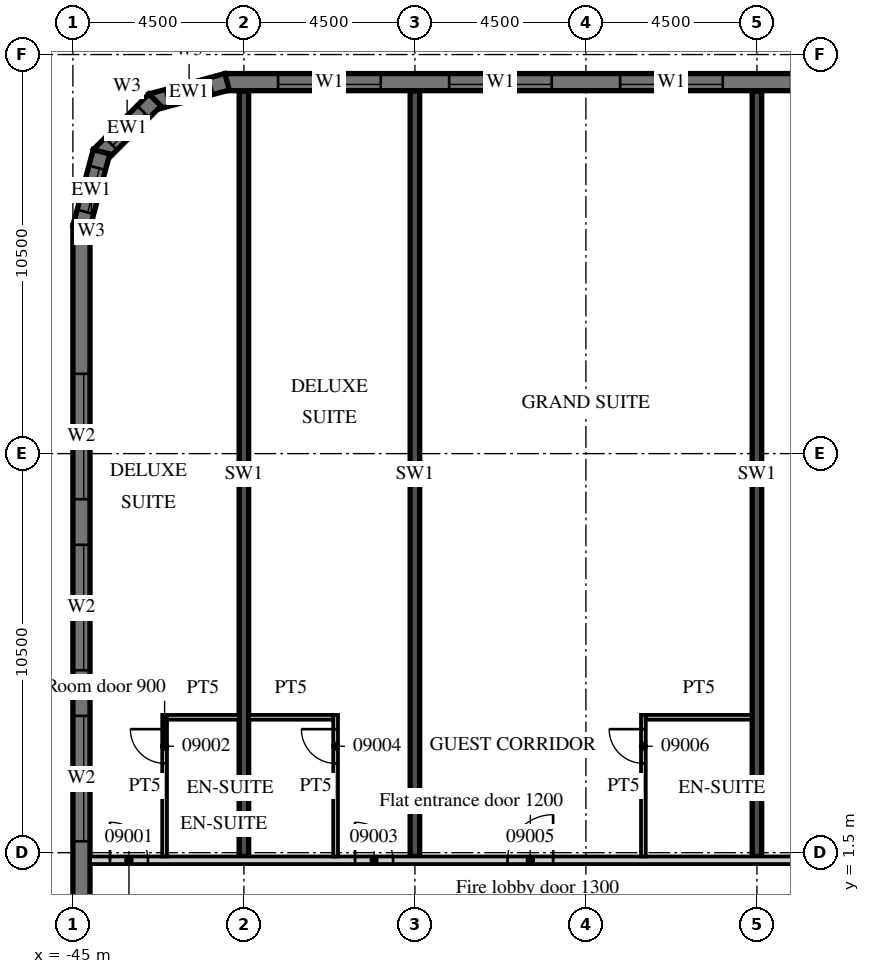
"""IFC4 building model, lengths in metres.
Left out: names, types, materials, properties, quantities, classifications, styles, units other than length and angle.
Written with IfcOpenShell. Run it as: python <this file> out.ifc"""

import sys

from ifc_helpers import new_model, si_unit, direction, frame, frame_2d, origin, place, context, subcontext, project, spatial, polyline, rectangle, outline, extrude, element, fill, save


model = new_model("IFC4")
c1 = context("Model", 3, precision=1e-05, world=origin(), true_north=direction((0.0, 1.0)))
c2 = subcontext(c1, "Body", "Model", "MODEL_VIEW")
j1 = project(units=[si_unit("LENGTHUNIT", "METRE"), si_unit("PLANEANGLEUNIT", "RADIAN")], contexts=[c1])
p1 = place(None, origin())
s1 = spatial("IfcSite", under=j1, at=p1, CompositionType="ELEMENT")
p2 = place(p1, origin())
s2 = spatial("IfcBuilding", under=s1, at=p2, CompositionType="ELEMENT")
p3 = place(p2, frame((0.0, 0.0, 60.0)))
s3 = spatial("IfcBuildingStorey", under=s2, at=p3, CompositionType="ELEMENT", Elevation=60.0)
for number, where, z_axis, x_axis in (
    (1, (-40.5, 1.4, 0.0), (0.0, 0.0, 1.0), (0.0, 1.0, 0.0)),
    (2, (-36.0, 1.4, 0.0), (0.0, 0.0, 1.0), (0.0, 1.0, 0.0)),
    (3, (-27.0, 1.4, 0.0), (0.0, 0.0, 1.0), (0.0, 1.0, 0.0)),
):
    element("IfcWall", number, at=place(p3, frame(where, z_axis=z_axis, x_axis=x_axis)), inside=s3, PredefinedType="SHEAR", context=c2, shape_type="SweptSolid", body=[
        extrude(rectangle(XDim=20.14, YDim=0.25, at=frame_2d((10.07, 0.0))), origin(), (0.0, 0.0, 1.0), 3.3),
    ])
p4 = place(p3, frame((13.5, 21.775, 0.0), z_axis=(0.0, 0.0, 1.0), x_axis=(-1.0, 0.0, 0.0)))
e4 = element("IfcWall", 4, at=p4, inside=s3, PredefinedType="SOLIDWALL", context=c2, shape_type="SweptSolid", body=[
    extrude(rectangle(XDim=54.5, YDim=0.45, at=frame_2d((27.25, 0.0))), origin(), (0.0, 0.0, 1.0), 3.02),
])
p5 = place(p4, frame((0.9, 0.0, 0.45)))
e5 = element("IfcOpeningElement", 5, at=p5, cuts=e4, PredefinedType="OPENING", context=c2, shape_type="SweptSolid", body=[
    extrude(rectangle(XDim=2.7, YDim=2.25, at=frame_2d((1.35, 1.125))), frame((0.0, 0.235, 0.0), z_axis=(0.0, -1.0, 0.0), x_axis=(1.0, 0.0, 0.0)), (0.0, 0.0, 1.0), 0.47),
])
p6 = place(p4, frame((5.4, 0.0, 0.45)))
e6 = element("IfcOpeningElement", 6, at=p6, cuts=e4, PredefinedType="OPENING", context=c2, shape_type="SweptSolid", body=[
    extrude(rectangle(XDim=2.7, YDim=2.25, at=frame_2d((1.35, 1.125))), frame((0.0, 0.235, 0.0), z_axis=(0.0, -1.0, 0.0), x_axis=(1.0, 0.0, 0.0)), (0.0, 0.0, 1.0), 0.47),
])
p7 = place(p4, frame((9.9, 0.0, 0.45)))
e7 = element("IfcOpeningElement", 7, at=p7, cuts=e4, PredefinedType="OPENING", context=c2, shape_type="SweptSolid", body=[
    extrude(rectangle(XDim=2.7, YDim=2.25, at=frame_2d((1.35, 1.125))), frame((0.0, 0.235, 0.0), z_axis=(0.0, -1.0, 0.0), x_axis=(1.0, 0.0, 0.0)), (0.0, 0.0, 1.0), 0.47),
])
p8 = place(p4, frame((14.4, 0.0, 0.45)))
e8 = element("IfcOpeningElement", 8, at=p8, cuts=e4, PredefinedType="OPENING", context=c2, shape_type="SweptSolid", body=[
    extrude(rectangle(XDim=2.7, YDim=2.25, at=frame_2d((1.35, 1.125))), frame((0.0, 0.235, 0.0), z_axis=(0.0, -1.0, 0.0), x_axis=(1.0, 0.0, 0.0)), (0.0, 0.0, 1.0), 0.47),
])
p9 = place(p4, frame((18.9, 0.0, 0.45)))
e9 = element("IfcOpeningElement", 9, at=p9, cuts=e4, PredefinedType="OPENING", context=c2, shape_type="SweptSolid", body=[
    extrude(rectangle(XDim=2.7, YDim=2.25, at=frame_2d((1.35, 1.125))), frame((0.0, 0.235, 0.0), z_axis=(0.0, -1.0, 0.0), x_axis=(1.0, 0.0, 0.0)), (0.0, 0.0, 1.0), 0.47),
])
p10 = place(p4, frame((23.4, 0.0, 0.45)))
e10 = element("IfcOpeningElement", 10, at=p10, cuts=e4, PredefinedType="OPENING", context=c2, shape_type="SweptSolid", body=[
    extrude(rectangle(XDim=2.7, YDim=2.25, at=frame_2d((1.35, 1.125))), frame((0.0, 0.235, 0.0), z_axis=(0.0, -1.0, 0.0), x_axis=(1.0, 0.0, 0.0)), (0.0, 0.0, 1.0), 0.47),
])
p11 = place(p4, frame((27.9, 0.0, 0.45)))
e11 = element("IfcOpeningElement", 11, at=p11, cuts=e4, PredefinedType="OPENING", context=c2, shape_type="SweptSolid", body=[
    extrude(rectangle(XDim=2.7, YDim=2.25, at=frame_2d((1.35, 1.125))), frame((0.0, 0.235, 0.0), z_axis=(0.0, -1.0, 0.0), x_axis=(1.0, 0.0, 0.0)), (0.0, 0.0, 1.0), 0.47),
])
p12 = place(p4, frame((32.4, 0.0, 0.45)))
e12 = element("IfcOpeningElement", 12, at=p12, cuts=e4, PredefinedType="OPENING", context=c2, shape_type="SweptSolid", body=[
    extrude(rectangle(XDim=2.7, YDim=2.25, at=frame_2d((1.35, 1.125))), frame((0.0, 0.235, 0.0), z_axis=(0.0, -1.0, 0.0), x_axis=(1.0, 0.0, 0.0)), (0.0, 0.0, 1.0), 0.47),
])
p13 = place(p4, frame((36.9, 0.0, 0.45)))
e13 = element("IfcOpeningElement", 13, at=p13, cuts=e4, PredefinedType="OPENING", context=c2, shape_type="SweptSolid", body=[
    extrude(rectangle(XDim=2.7, YDim=2.25, at=frame_2d((1.35, 1.125))), frame((0.0, 0.235, 0.0), z_axis=(0.0, -1.0, 0.0), x_axis=(1.0, 0.0, 0.0)), (0.0, 0.0, 1.0), 0.47),
])
p14 = place(p4, frame((41.4, 0.0, 0.45)))
e14 = element("IfcOpeningElement", 14, at=p14, cuts=e4, PredefinedType="OPENING", context=c2, shape_type="SweptSolid", body=[
    extrude(rectangle(XDim=2.7, YDim=2.25, at=frame_2d((1.35, 1.125))), frame((0.0, 0.235, 0.0), z_axis=(0.0, -1.0, 0.0), x_axis=(1.0, 0.0, 0.0)), (0.0, 0.0, 1.0), 0.47),
])
p15 = place(p4, frame((45.9, 0.0, 0.45)))
e15 = element("IfcOpeningElement", 15, at=p15, cuts=e4, PredefinedType="OPENING", context=c2, shape_type="SweptSolid", body=[
    extrude(rectangle(XDim=2.7, YDim=2.25, at=frame_2d((1.35, 1.125))), frame((0.0, 0.235, 0.0), z_axis=(0.0, -1.0, 0.0), x_axis=(1.0, 0.0, 0.0)), (0.0, 0.0, 1.0), 0.47),
])
p16 = place(p4, frame((50.4, 0.0, 0.45)))
e16 = element("IfcOpeningElement", 16, at=p16, cuts=e4, PredefinedType="OPENING", context=c2, shape_type="SweptSolid", body=[
    extrude(rectangle(XDim=2.7, YDim=2.25, at=frame_2d((1.35, 1.125))), frame((0.0, 0.235, 0.0), z_axis=(0.0, -1.0, 0.0), x_axis=(1.0, 0.0, 0.0)), (0.0, 0.0, 1.0), 0.47),
])
p17 = place(p3, frame((-40.942, 21.783, 0.0), z_axis=(0.0, 0.0, 1.0), x_axis=(-0.965926999034, -0.25881466832, 0.0)))
e17 = element("IfcWall", 17, at=p17, inside=s3, PredefinedType="SOLIDWALL", context=c2, shape_type="SweptSolid", body=[
    extrude(outline(polyline([(0.0, -0.225), (2.071, -0.225), (1.95, 0.225), (0.121, 0.225), (0.0, -0.225)])), origin(), (0.0, 0.0, 1.0), 3.02),
])
p18 = place(p17, frame((0.435, 0.0, 0.45)))
e18 = element("IfcOpeningElement", 18, at=p18, cuts=e17, PredefinedType="OPENING", context=c2, shape_type="SweptSolid", body=[
    extrude(rectangle(XDim=1.2, YDim=2.25, at=frame_2d((0.6, 1.125))), frame((0.0, 0.235, 0.0), z_axis=(0.0, -1.0, 0.0), x_axis=(1.0, 0.0, 0.0)), (0.0, 0.0, 1.0), 0.47),
])
p19 = place(p3, frame((-42.841, 21.305, 0.0), z_axis=(0.0, 0.0, 1.0), x_axis=(-0.707106781187, -0.707106781187, 0.0)))
e19 = element("IfcWall", 19, at=p19, inside=s3, PredefinedType="SOLIDWALL", context=c2, shape_type="SweptSolid", body=[
    extrude(outline(polyline([(0.0, -0.225), (2.071, -0.225), (1.95, 0.225), (0.121, 0.225), (0.0, -0.225)])), origin(), (0.0, 0.0, 1.0), 3.02),
])
p20 = place(p19, frame((0.435, 0.0, 0.45)))
e20 = element("IfcOpeningElement", 20, at=p20, cuts=e19, PredefinedType="OPENING", context=c2, shape_type="SweptSolid", body=[
    extrude(rectangle(XDim=1.2, YDim=2.25, at=frame_2d((0.6, 1.125))), frame((0.0, 0.235, 0.0), z_axis=(0.0, -1.0, 0.0), x_axis=(1.0, 0.0, 0.0)), (0.0, 0.0, 1.0), 0.47),
])
p21 = place(p3, frame((-44.247, 19.942, 0.0), z_axis=(0.0, 0.0, 1.0), x_axis=(-0.25881466832, -0.965926999034, 0.0)))
e21 = element("IfcWall", 21, at=p21, inside=s3, PredefinedType="SOLIDWALL", context=c2, shape_type="SweptSolid", body=[
    extrude(outline(polyline([(-0.0, -0.225), (2.07, -0.225), (1.95, 0.225), (0.12, 0.225), (-0.0, -0.225)])), origin(), (0.0, 0.0, 1.0), 3.02),
])
p22 = place(p21, frame((0.435, 0.0, 0.45)))
e22 = element("IfcOpeningElement", 22, at=p22, cuts=e21, PredefinedType="OPENING", context=c2, shape_type="SweptSolid", body=[
    extrude(rectangle(XDim=1.2, YDim=2.25, at=frame_2d((0.6, 1.125))), frame((0.0, 0.235, 0.0), z_axis=(0.0, -1.0, 0.0), x_axis=(1.0, 0.0, 0.0)), (0.0, 0.0, 1.0), 0.47),
])
p23 = place(p3, frame((-44.775, 18.0, 0.0), z_axis=(0.0, 0.0, 1.0), x_axis=(0.0, -1.0, 0.0)))
e23 = element("IfcWall", 23, at=p23, inside=s3, PredefinedType="SOLIDWALL", context=c2, shape_type="SweptSolid", body=[
    extrude(rectangle(XDim=36.0, YDim=0.45, at=frame_2d((18.0, 0.0))), origin(), (0.0, 0.0, 1.0), 3.02),
])
p24 = place(p23, frame((3.9, 0.0, 0.45)))
e24 = element("IfcOpeningElement", 24, at=p24, cuts=e23, PredefinedType="OPENING", context=c2, shape_type="SweptSolid", body=[
    extrude(rectangle(XDim=3.3, YDim=2.25, at=frame_2d((1.65, 1.125))), frame((0.0, 0.235, 0.0), z_axis=(0.0, -1.0, 0.0), x_axis=(1.0, 0.0, 0.0)), (0.0, 0.0, 1.0), 0.47),
])
p25 = place(p23, frame((8.4, 0.0, 0.45)))
e25 = element("IfcOpeningElement", 25, at=p25, cuts=e23, PredefinedType="OPENING", context=c2, shape_type="SweptSolid", body=[
    extrude(rectangle(XDim=3.3, YDim=2.25, at=frame_2d((1.65, 1.125))), frame((0.0, 0.235, 0.0), z_axis=(0.0, -1.0, 0.0), x_axis=(1.0, 0.0, 0.0)), (0.0, 0.0, 1.0), 0.47),
])
p26 = place(p23, frame((12.9, 0.0, 0.45)))
e26 = element("IfcOpeningElement", 26, at=p26, cuts=e23, PredefinedType="OPENING", context=c2, shape_type="SweptSolid", body=[
    extrude(rectangle(XDim=3.3, YDim=2.25, at=frame_2d((1.65, 1.125))), frame((0.0, 0.235, 0.0), z_axis=(0.0, -1.0, 0.0), x_axis=(1.0, 0.0, 0.0)), (0.0, 0.0, 1.0), 0.47),
])
p27 = place(p3, frame((-44.55, 1.3, 0.0), z_axis=(0.0, 0.0, 1.0), x_axis=(1.0, 0.0, 0.0)))
e27 = element("IfcWall", 27, at=p27, inside=s3, PredefinedType="PARTITIONING", context=c2, shape_type="SweptSolid", body=[
    extrude(rectangle(XDim=58.05, YDim=0.2, at=frame_2d((29.025, 0.0))), origin(), (0.0, 0.0, 1.0), 3.02),
])
p28 = place(p27, frame((0.525, 0.0, 0.0)))
e28 = element("IfcOpeningElement", 28, at=p28, cuts=e27, PredefinedType="OPENING", context=c2, shape_type="SweptSolid", body=[
    extrude(rectangle(XDim=1.0, YDim=2.1, at=frame_2d((0.5, 1.05))), frame((0.0, 0.11, 0.0), z_axis=(0.0, -1.0, 0.0), x_axis=(1.0, 0.0, 0.0)), (0.0, 0.0, 1.0), 0.22),
])
p29 = place(p27, frame((6.975, 0.0, 0.0)))
e29 = element("IfcOpeningElement", 29, at=p29, cuts=e27, PredefinedType="OPENING", context=c2, shape_type="SweptSolid", body=[
    extrude(rectangle(XDim=1.0, YDim=2.1, at=frame_2d((0.5, 1.05))), frame((0.0, 0.11, 0.0), z_axis=(0.0, -1.0, 0.0), x_axis=(1.0, 0.0, 0.0)), (0.0, 0.0, 1.0), 0.22),
])
p30 = place(p27, frame((10.987, 0.0, 0.0)))
e30 = element("IfcOpeningElement", 30, at=p30, cuts=e27, PredefinedType="OPENING", context=c2, shape_type="SweptSolid", body=[
    extrude(rectangle(XDim=1.2, YDim=2.1, at=frame_2d((0.6, 1.05))), frame((0.0, 0.11, 0.0), z_axis=(0.0, -1.0, 0.0), x_axis=(1.0, 0.0, 0.0)), (0.0, 0.0, 1.0), 0.22),
])
p31 = place(p27, frame((19.987, 0.0, 0.0)))
e31 = element("IfcOpeningElement", 31, at=p31, cuts=e27, PredefinedType="OPENING", context=c2, shape_type="SweptSolid", body=[
    extrude(rectangle(XDim=1.2, YDim=2.1, at=frame_2d((0.6, 1.05))), frame((0.0, 0.11, 0.0), z_axis=(0.0, -1.0, 0.0), x_axis=(1.0, 0.0, 0.0)), (0.0, 0.0, 1.0), 0.22),
])
p32 = place(p27, frame((29.5, 0.0, 0.0)))
e32 = element("IfcOpeningElement", 32, at=p32, cuts=e27, PredefinedType="OPENING", context=c2, shape_type="SweptSolid", body=[
    extrude(rectangle(XDim=1.0, YDim=2.1, at=frame_2d((0.5, 1.05))), frame((0.0, 0.11, 0.0), z_axis=(0.0, -1.0, 0.0), x_axis=(1.0, 0.0, 0.0)), (0.0, 0.0, 1.0), 0.22),
])
p33 = place(p27, frame((33.975, 0.0, 0.0)))
e33 = element("IfcOpeningElement", 33, at=p33, cuts=e27, PredefinedType="OPENING", context=c2, shape_type="SweptSolid", body=[
    extrude(rectangle(XDim=1.0, YDim=2.1, at=frame_2d((0.5, 1.05))), frame((0.0, 0.11, 0.0), z_axis=(0.0, -1.0, 0.0), x_axis=(1.0, 0.0, 0.0)), (0.0, 0.0, 1.0), 0.22),
])
p34 = place(p27, frame((40.912, 0.0, 0.0)))
e34 = element("IfcOpeningElement", 34, at=p34, cuts=e27, PredefinedType="OPENING", context=c2, shape_type="SweptSolid", body=[
    extrude(rectangle(XDim=1.2, YDim=2.1, at=frame_2d((0.6, 1.05))), frame((0.0, 0.11, 0.0), z_axis=(0.0, -1.0, 0.0), x_axis=(1.0, 0.0, 0.0)), (0.0, 0.0, 1.0), 0.22),
])
p35 = place(p27, frame((47.5, 0.0, 0.0)))
e35 = element("IfcOpeningElement", 35, at=p35, cuts=e27, PredefinedType="OPENING", context=c2, shape_type="SweptSolid", body=[
    extrude(rectangle(XDim=1.0, YDim=2.1, at=frame_2d((0.5, 1.05))), frame((0.0, 0.11, 0.0), z_axis=(0.0, -1.0, 0.0), x_axis=(1.0, 0.0, 0.0)), (0.0, 0.0, 1.0), 0.22),
])
p36 = place(p27, frame((51.975, 0.0, 0.0)))
e36 = element("IfcOpeningElement", 36, at=p36, cuts=e27, PredefinedType="OPENING", context=c2, shape_type="SweptSolid", body=[
    extrude(rectangle(XDim=1.0, YDim=2.1, at=frame_2d((0.5, 1.05))), frame((0.0, 0.11, 0.0), z_axis=(0.0, -1.0, 0.0), x_axis=(1.0, 0.0, 0.0)), (0.0, 0.0, 1.0), 0.22),
])
p37 = place(p27, frame((56.475, 0.0, 0.0)))
e37 = element("IfcOpeningElement", 37, at=p37, cuts=e27, PredefinedType="OPENING", context=c2, shape_type="SweptSolid", body=[
    extrude(rectangle(XDim=1.0, YDim=2.1, at=frame_2d((0.5, 1.05))), frame((0.0, 0.11, 0.0), z_axis=(0.0, -1.0, 0.0), x_axis=(1.0, 0.0, 0.0)), (0.0, 0.0, 1.0), 0.22),
])
p38 = place(p3, frame((-42.587, 1.4, 0.0), z_axis=(0.0, 0.0, 1.0), x_axis=(0.0, 1.0, 0.0)))
e38 = element("IfcWall", 38, at=p38, inside=s3, PredefinedType="PARTITIONING", context=c2, shape_type="SweptSolid", body=[
    extrude(rectangle(XDim=3.725, YDim=0.125, at=frame_2d((1.863, 0.0))), origin(), (0.0, 0.0, 1.0), 3.02),
])
p39 = place(p38, frame((2.45, 0.0, 0.0)))
e39 = element("IfcOpeningElement", 39, at=p39, cuts=e38, PredefinedType="OPENING", context=c2, shape_type="SweptSolid", body=[
    extrude(rectangle(XDim=0.9, YDim=2.1, at=frame_2d((0.45, 1.05))), frame((0.0, 0.073, 0.0), z_axis=(0.0, -1.0, 0.0), x_axis=(1.0, 0.0, 0.0)), (0.0, 0.0, 1.0), 0.145),
])
p40 = place(p3, frame((-42.525, 5.062, 0.0), z_axis=(0.0, 0.0, 1.0), x_axis=(1.0, 0.0, 0.0)))
e40 = element("IfcWall", 40, at=p40, inside=s3, PredefinedType="PARTITIONING", context=c2, shape_type="SweptSolid", body=[
    extrude(rectangle(XDim=1.9, YDim=0.125, at=frame_2d((0.95, 0.0))), origin(), (0.0, 0.0, 1.0), 3.02),
])
p41 = place(p3, frame((-38.087, 1.4, 0.0), z_axis=(0.0, 0.0, 1.0), x_axis=(0.0, 1.0, 0.0)))
e41 = element("IfcWall", 41, at=p41, inside=s3, PredefinedType="PARTITIONING", context=c2, shape_type="SweptSolid", body=[
    extrude(rectangle(XDim=3.725, YDim=0.125, at=frame_2d((1.863, 0.0))), origin(), (0.0, 0.0, 1.0), 3.02),
])
p42 = place(p41, frame((2.45, 0.0, 0.0)))
e42 = element("IfcOpeningElement", 42, at=p42, cuts=e41, PredefinedType="OPENING", context=c2, shape_type="SweptSolid", body=[
    extrude(rectangle(XDim=0.9, YDim=2.1, at=frame_2d((0.45, 1.05))), frame((0.0, 0.073, 0.0), z_axis=(0.0, -1.0, 0.0), x_axis=(1.0, 0.0, 0.0)), (0.0, 0.0, 1.0), 0.145),
])
p43 = place(p3, frame((-40.375, 5.062, 0.0), z_axis=(0.0, 0.0, 1.0), x_axis=(1.0, 0.0, 0.0)))
e43 = element("IfcWall", 43, at=p43, inside=s3, PredefinedType="PARTITIONING", context=c2, shape_type="SweptSolid", body=[
    extrude(rectangle(XDim=2.225, YDim=0.125, at=frame_2d((1.113, 0.0))), origin(), (0.0, 0.0, 1.0), 3.02),
])
p44 = place(p3, frame((-29.988, 1.4, 0.0), z_axis=(0.0, 0.0, 1.0), x_axis=(0.0, 1.0, 0.0)))
e44 = element("IfcWall", 44, at=p44, inside=s3, PredefinedType="PARTITIONING", context=c2, shape_type="SweptSolid", body=[
    extrude(rectangle(XDim=3.725, YDim=0.125, at=frame_2d((1.863, 0.0))), origin(), (0.0, 0.0, 1.0), 3.02),
])
p45 = place(p44, frame((2.45, 0.0, 0.0)))
e45 = element("IfcOpeningElement", 45, at=p45, cuts=e44, PredefinedType="OPENING", context=c2, shape_type="SweptSolid", body=[
    extrude(rectangle(XDim=0.9, YDim=2.1, at=frame_2d((0.45, 1.05))), frame((0.0, 0.073, 0.0), z_axis=(0.0, -1.0, 0.0), x_axis=(1.0, 0.0, 0.0)), (0.0, 0.0, 1.0), 0.145),
])
p46 = place(p3, frame((-29.925, 5.062, 0.0), z_axis=(0.0, 0.0, 1.0), x_axis=(1.0, 0.0, 0.0)))
e46 = element("IfcWall", 46, at=p46, inside=s3, PredefinedType="PARTITIONING", context=c2, shape_type="SweptSolid", body=[
    extrude(rectangle(XDim=2.8, YDim=0.125, at=frame_2d((1.4, 0.0))), origin(), (0.0, 0.0, 1.0), 3.02),
])
p47 = place(p14, origin())
e47 = element("IfcWindow", 47, at=p47, inside=s3, PartitioningType="SINGLE_PANEL", PredefinedType="WINDOW", context=c2, shape_type="SweptSolid", body=[
    extrude(rectangle(XDim=2.7, YDim=2.25, at=frame_2d((1.35, 1.125))), frame((0.0, 0.09, 0.0), z_axis=(0.0, -1.0, 0.0), x_axis=(1.0, 0.0, 0.0)), (0.0, 0.0, 1.0), 0.06),
])
fill(e14, e47)
p48 = place(p15, origin())
e48 = element("IfcWindow", 48, at=p48, inside=s3, PartitioningType="SINGLE_PANEL", PredefinedType="WINDOW", context=c2, shape_type="SweptSolid", body=[
    extrude(rectangle(XDim=2.7, YDim=2.25, at=frame_2d((1.35, 1.125))), frame((0.0, 0.09, 0.0), z_axis=(0.0, -1.0, 0.0), x_axis=(1.0, 0.0, 0.0)), (0.0, 0.0, 1.0), 0.06),
])
fill(e15, e48)
p49 = place(p16, origin())
e49 = element("IfcWindow", 49, at=p49, inside=s3, PartitioningType="SINGLE_PANEL", PredefinedType="WINDOW", context=c2, shape_type="SweptSolid", body=[
    extrude(rectangle(XDim=2.7, YDim=2.25, at=frame_2d((1.35, 1.125))), frame((0.0, 0.09, 0.0), z_axis=(0.0, -1.0, 0.0), x_axis=(1.0, 0.0, 0.0)), (0.0, 0.0, 1.0), 0.06),
])
fill(e16, e49)
p50 = place(p18, origin())
e50 = element("IfcWindow", 50, at=p50, inside=s3, PartitioningType="SINGLE_PANEL", PredefinedType="WINDOW", context=c2, shape_type="SweptSolid", body=[
    extrude(rectangle(XDim=1.2, YDim=2.25, at=frame_2d((0.6, 1.125))), frame((0.0, 0.09, 0.0), z_axis=(0.0, -1.0, 0.0), x_axis=(1.0, 0.0, 0.0)), (0.0, 0.0, 1.0), 0.06),
])
fill(e18, e50)
p51 = place(p20, origin())
e51 = element("IfcWindow", 51, at=p51, inside=s3, PartitioningType="SINGLE_PANEL", PredefinedType="WINDOW", context=c2, shape_type="SweptSolid", body=[
    extrude(rectangle(XDim=1.2, YDim=2.25, at=frame_2d((0.6, 1.125))), frame((0.0, 0.09, 0.0), z_axis=(0.0, -1.0, 0.0), x_axis=(1.0, 0.0, 0.0)), (0.0, 0.0, 1.0), 0.06),
])
fill(e20, e51)
p52 = place(p22, origin())
e52 = element("IfcWindow", 52, at=p52, inside=s3, PartitioningType="SINGLE_PANEL", PredefinedType="WINDOW", context=c2, shape_type="SweptSolid", body=[
    extrude(rectangle(XDim=1.2, YDim=2.25, at=frame_2d((0.6, 1.125))), frame((0.0, 0.09, 0.0), z_axis=(0.0, -1.0, 0.0), x_axis=(1.0, 0.0, 0.0)), (0.0, 0.0, 1.0), 0.06),
])
fill(e22, e52)
p53 = place(p24, origin())
e53 = element("IfcWindow", 53, at=p53, inside=s3, PartitioningType="SINGLE_PANEL", PredefinedType="WINDOW", context=c2, shape_type="SweptSolid", body=[
    extrude(rectangle(XDim=3.3, YDim=2.25, at=frame_2d((1.65, 1.125))), frame((0.0, 0.09, 0.0), z_axis=(0.0, -1.0, 0.0), x_axis=(1.0, 0.0, 0.0)), (0.0, 0.0, 1.0), 0.06),
])
fill(e24, e53)
p54 = place(p25, origin())
e54 = element("IfcWindow", 54, at=p54, inside=s3, PartitioningType="SINGLE_PANEL", PredefinedType="WINDOW", context=c2, shape_type="SweptSolid", body=[
    extrude(rectangle(XDim=3.3, YDim=2.25, at=frame_2d((1.65, 1.125))), frame((0.0, 0.09, 0.0), z_axis=(0.0, -1.0, 0.0), x_axis=(1.0, 0.0, 0.0)), (0.0, 0.0, 1.0), 0.06),
])
fill(e25, e54)
p55 = place(p26, origin())
e55 = element("IfcWindow", 55, at=p55, inside=s3, PartitioningType="SINGLE_PANEL", PredefinedType="WINDOW", context=c2, shape_type="SweptSolid", body=[
    extrude(rectangle(XDim=3.3, YDim=2.25, at=frame_2d((1.65, 1.125))), frame((0.0, 0.09, 0.0), z_axis=(0.0, -1.0, 0.0), x_axis=(1.0, 0.0, 0.0)), (0.0, 0.0, 1.0), 0.06),
])
fill(e26, e55)
p56 = place(p28, origin())
e56 = element("IfcDoor", 56, at=p56, inside=s3, OperationType="SINGLE_SWING_LEFT", PredefinedType="DOOR", context=c2, shape_type="SweptSolid", body=[
    extrude(rectangle(XDim=1.0, YDim=2.1, at=frame_2d((0.5, 1.05))), frame((0.0, 0.025, 0.0), z_axis=(0.0, -1.0, 0.0), x_axis=(1.0, 0.0, 0.0)), (0.0, 0.0, 1.0), 0.05),
])
fill(e28, e56)
p57 = place(p39, origin())
e57 = element("IfcDoor", 57, at=p57, inside=s3, OperationType="SINGLE_SWING_RIGHT", PredefinedType="DOOR", context=c2, shape_type="SweptSolid", body=[
    extrude(rectangle(XDim=0.9, YDim=2.1, at=frame_2d((0.45, 1.05))), frame((0.0, 0.025, 0.0), z_axis=(0.0, -1.0, 0.0), x_axis=(1.0, 0.0, 0.0)), (0.0, 0.0, 1.0), 0.05),
])
fill(e39, e57)
p58 = place(p29, origin())
e58 = element("IfcDoor", 58, at=p58, inside=s3, OperationType="SINGLE_SWING_LEFT", PredefinedType="DOOR", context=c2, shape_type="SweptSolid", body=[
    extrude(rectangle(XDim=1.0, YDim=2.1, at=frame_2d((0.5, 1.05))), frame((0.0, 0.025, 0.0), z_axis=(0.0, -1.0, 0.0), x_axis=(1.0, 0.0, 0.0)), (0.0, 0.0, 1.0), 0.05),
])
fill(e29, e58)
p59 = place(p42, origin())
e59 = element("IfcDoor", 59, at=p59, inside=s3, OperationType="SINGLE_SWING_RIGHT", PredefinedType="DOOR", context=c2, shape_type="SweptSolid", body=[
    extrude(rectangle(XDim=0.9, YDim=2.1, at=frame_2d((0.45, 1.05))), frame((0.0, 0.025, 0.0), z_axis=(0.0, -1.0, 0.0), x_axis=(1.0, 0.0, 0.0)), (0.0, 0.0, 1.0), 0.05),
])
fill(e42, e59)
p60 = place(p30, origin())
e60 = element("IfcDoor", 60, at=p60, inside=s3, OperationType="SINGLE_SWING_RIGHT", PredefinedType="DOOR", context=c2, shape_type="SweptSolid", body=[
    extrude(rectangle(XDim=1.2, YDim=2.1, at=frame_2d((0.6, 1.05))), frame((0.0, 0.025, 0.0), z_axis=(0.0, -1.0, 0.0), x_axis=(1.0, 0.0, 0.0)), (0.0, 0.0, 1.0), 0.05),
])
fill(e30, e60)
p61 = place(p45, origin())
e61 = element("IfcDoor", 61, at=p61, inside=s3, OperationType="SINGLE_SWING_RIGHT", PredefinedType="DOOR", context=c2, shape_type="SweptSolid", body=[
    extrude(rectangle(XDim=0.9, YDim=2.1, at=frame_2d((0.45, 1.05))), frame((0.0, 0.025, 0.0), z_axis=(0.0, -1.0, 0.0), x_axis=(1.0, 0.0, 0.0)), (0.0, 0.0, 1.0), 0.05),
])
fill(e45, e61)
save(model, sys.argv[1])
